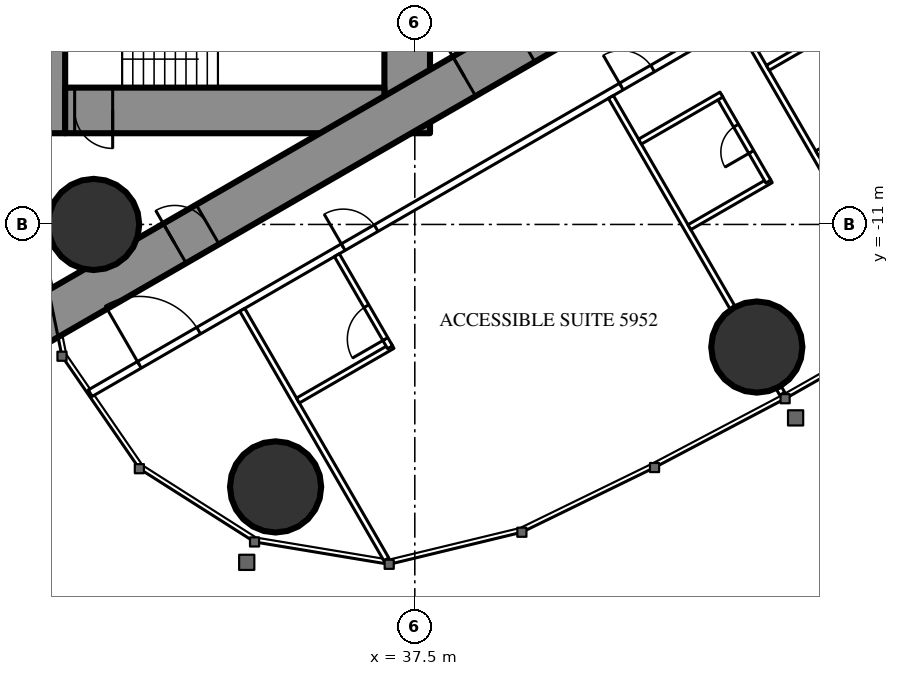
"""IFC4 building model, lengths in metres.
Left out: names, types, materials, properties, quantities, classifications, styles, units other than length and angle.
Written with IfcOpenShell. Run it as: python <this file> out.ifc"""

import sys

from ifc_helpers import new_model, si_unit, direction, frame, frame_2d, origin, origin_2d, place, context, subcontext, project, spatial, rectangle, circle, extrude, element, fill, save


model = new_model("IFC4")
c1 = context("Model", 3, precision=1e-05, world=origin(), true_north=direction((0.0, 1.0)))
c2 = subcontext(c1, "Body", "Model", "MODEL_VIEW")
j1 = project(units=[si_unit("LENGTHUNIT", "METRE"), si_unit("PLANEANGLEUNIT", "RADIAN")], contexts=[c1])
p1 = place(None, origin())
s1 = spatial("IfcSite", under=j1, at=p1, CompositionType="ELEMENT")
p2 = place(p1, origin())
s2 = spatial("IfcBuilding", under=s1, at=p2, CompositionType="ELEMENT")
p3 = place(p2, frame((0.0, 0.0, 222.5)))
s3 = spatial("IfcBuildingStorey", under=s2, at=p3, CompositionType="ELEMENT", Elevation=222.5)
for number, where, z_axis, x_axis in (
    (1, (33.837, -17.906, 0.0), (0.0, 0.0, 1.0), (1.0, 0.0, 0.0)),
    (2, (29.05, -11.0, 0.0), (0.0, 0.0, 1.0), (1.0, 0.0, 0.0)),
    (3, (46.499, -14.226, 0.0), (0.0, 0.0, 1.0), (1.0, 0.0, 0.0)),
):
    element("IfcColumn", number, at=place(p3, frame(where, z_axis=z_axis, x_axis=x_axis)), inside=s3, PredefinedType="COLUMN", context=c2, shape_type="SweptSolid", body=[
        extrude(circle(Radius=1.2, at=origin_2d()), origin(), (0.0, 0.0, 1.0), 3.6),
    ])
p4 = place(p3, frame((27.9, -8.6, 0.0), z_axis=(0.0, 0.0, 1.0), x_axis=(0.0, 1.0, 0.0)))
e4 = element("IfcWall", 4, at=p4, inside=s3, PredefinedType="SHEAR", context=c2, shape_type="SweptSolid", body=[
    extrude(rectangle(XDim=17.2, YDim=0.8, at=frame_2d((8.6, 0.0))), origin(), (0.0, 0.0, 1.0), 3.6),
])
p5 = place(p4, frame((9.35, 0.0, 0.0)))
e5 = element("IfcOpeningElement", 5, at=p5, cuts=e4, PredefinedType="OPENING", context=c2, shape_type="SweptSolid", body=[
    extrude(rectangle(XDim=0.9, YDim=2.2, at=frame_2d((0.45, 1.1))), frame((0.0, 0.41, 0.0), z_axis=(0.0, -1.0, 0.0), x_axis=(1.0, 0.0, 0.0)), (0.0, 0.0, 1.0), 0.82),
])
p6 = place(p3, frame((37.3, -8.6, 0.0), z_axis=(0.0, 0.0, 1.0), x_axis=(0.0, 1.0, 0.0)))
e6 = element("IfcWall", 6, at=p6, inside=s3, PredefinedType="SHEAR", context=c2, shape_type="SweptSolid", body=[
    extrude(rectangle(XDim=17.2, YDim=1.2, at=frame_2d((8.6, 0.0))), origin(), (0.0, 0.0, 1.0), 3.6),
])
p7 = place(p6, frame((7.7, 0.0, 0.0)))
e7 = element("IfcOpeningElement", 7, at=p7, cuts=e6, PredefinedType="OPENING", context=c2, shape_type="SweptSolid", body=[
    extrude(rectangle(XDim=1.8, YDim=2.2, at=frame_2d((0.9, 1.1))), frame((0.0, 0.61, 0.0), z_axis=(0.0, -1.0, 0.0), x_axis=(1.0, 0.0, 0.0)), (0.0, 0.0, 1.0), 1.22),
])
p8 = place(p3, frame((28.3, -8.0, 0.0), z_axis=(0.0, 0.0, 1.0), x_axis=(1.0, 0.0, 0.0)))
e8 = element("IfcWall", 8, at=p8, inside=s3, PredefinedType="SHEAR", context=c2, shape_type="SweptSolid", body=[
    extrude(rectangle(XDim=8.4, YDim=1.2, at=frame_2d((4.2, 0.0))), origin(), (0.0, 0.0, 1.0), 3.6),
])
p9 = place(p8, frame((0.25, 0.0, 0.0)))
e9 = element("IfcOpeningElement", 9, at=p9, cuts=e8, PredefinedType="OPENING", context=c2, shape_type="SweptSolid", body=[
    extrude(rectangle(XDim=1.0, YDim=2.2, at=frame_2d((0.5, 1.1))), frame((0.0, 0.61, 0.0), z_axis=(0.0, -1.0, 0.0), x_axis=(1.0, 0.0, 0.0)), (0.0, 0.0, 1.0), 1.22),
])
p10 = place(p3, frame((27.2, -13.8, 0.0), z_axis=(0.0, 0.0, 1.0), x_axis=(0.866027159892, 0.499996958321, 0.0)))
e10 = element("IfcWall", 10, at=p10, inside=s3, PredefinedType="SHEAR", context=c2, shape_type="SweptSolid", body=[
    extrude(rectangle(XDim=27.947, YDim=1.2, at=frame_2d((13.973, 0.0))), origin(), (0.0, 0.0, 1.0), 3.6),
])
p11 = place(p10, frame((4.6, 0.0, 0.0)))
e11 = element("IfcOpeningElement", 11, at=p11, cuts=e10, PredefinedType="OPENING", context=c2, shape_type="SweptSolid", body=[
    extrude(rectangle(XDim=1.0, YDim=2.2, at=frame_2d((0.5, 1.1))), frame((0.0, 0.61, 0.0), z_axis=(0.0, -1.0, 0.0), x_axis=(1.0, 0.0, 0.0)), (0.0, 0.0, 1.0), 1.22),
])
p12 = place(p10, frame((13.395, 0.0, 0.0)))
e12 = element("IfcOpeningElement", 12, at=p12, cuts=e10, PredefinedType="OPENING", context=c2, shape_type="SweptSolid", body=[
    extrude(rectangle(XDim=1.8, YDim=2.2, at=frame_2d((0.9, 1.1))), frame((0.0, 0.61, 0.0), z_axis=(0.0, -1.0, 0.0), x_axis=(1.0, 0.0, 0.0)), (0.0, 0.0, 1.0), 1.22),
])
p13 = place(p3, frame((28.959, -15.44, 0.0), z_axis=(0.0, 0.0, 1.0), x_axis=(0.866025227435, 0.500000305447, 0.0)))
e13 = element("IfcWall", 13, at=p13, inside=s3, PredefinedType="PARTITIONING", context=c2, shape_type="SweptSolid", body=[
    extrude(rectangle(XDim=30.88, YDim=0.2, at=frame_2d((15.44, 0.0))), origin(), (0.0, 0.0, 1.0), 3.35),
])
p14 = place(p13, frame((1.494, 0.0, 0.0)))
e14 = element("IfcOpeningElement", 14, at=p14, cuts=e13, PredefinedType="OPENING", context=c2, shape_type="SweptSolid", body=[
    extrude(rectangle(XDim=1.8, YDim=2.03, at=frame_2d((0.9, 1.015))), frame((0.0, 0.11, 0.0), z_axis=(0.0, -1.0, 0.0), x_axis=(1.0, 0.0, 0.0)), (0.0, 0.0, 1.0), 0.22),
])
p15 = place(p13, frame((7.687, 0.0, 0.0)))
e15 = element("IfcOpeningElement", 15, at=p15, cuts=e13, PredefinedType="OPENING", context=c2, shape_type="SweptSolid", body=[
    extrude(rectangle(XDim=1.0, YDim=2.2, at=frame_2d((0.5, 1.1))), frame((0.0, 0.11, 0.0), z_axis=(0.0, -1.0, 0.0), x_axis=(1.0, 0.0, 0.0)), (0.0, 0.0, 1.0), 0.22),
])
p16 = place(p13, frame((16.137, 0.0, 0.0)))
e16 = element("IfcOpeningElement", 16, at=p16, cuts=e13, PredefinedType="OPENING", context=c2, shape_type="SweptSolid", body=[
    extrude(rectangle(XDim=0.95, YDim=2.2, at=frame_2d((0.475, 1.1))), frame((0.0, 0.11, 0.0), z_axis=(0.0, -1.0, 0.0), x_axis=(1.0, 0.0, 0.0)), (0.0, 0.0, 1.0), 0.22),
])
p17 = place(p13, frame((20.021, 0.0, 0.0)))
e17 = element("IfcOpeningElement", 17, at=p17, cuts=e13, PredefinedType="OPENING", context=c2, shape_type="SweptSolid", body=[
    extrude(rectangle(XDim=0.95, YDim=2.2, at=frame_2d((0.475, 1.1))), frame((0.0, 0.11, 0.0), z_axis=(0.0, -1.0, 0.0), x_axis=(1.0, 0.0, 0.0)), (0.0, 0.0, 1.0), 0.22),
])
p18 = place(p13, frame((26.253, 0.0, 0.0)))
e18 = element("IfcOpeningElement", 18, at=p18, cuts=e13, PredefinedType="OPENING", context=c2, shape_type="SweptSolid", body=[
    extrude(rectangle(XDim=0.95, YDim=2.2, at=frame_2d((0.475, 1.1))), frame((0.0, 0.11, 0.0), z_axis=(0.0, -1.0, 0.0), x_axis=(1.0, 0.0, 0.0)), (0.0, 0.0, 1.0), 0.22),
])
p19 = place(p3, frame((32.96, -13.246, 0.0), z_axis=(0.0, 0.0, 1.0), x_axis=(0.500000236886, -0.866025267018, 0.0)))
e19 = element("IfcWall", 19, at=p19, inside=s3, PredefinedType="PARTITIONING", context=c2, shape_type="SweptSolid", body=[
    extrude(rectangle(XDim=7.583, YDim=0.15, at=frame_2d((3.791, 0.0))), origin(), (0.0, 0.0, 1.0), 3.35),
])
p20 = place(p3, frame((42.66, -7.646, 0.0), z_axis=(0.0, 0.0, 1.0), x_axis=(0.499996592859, -0.866027370889, 0.0)))
e20 = element("IfcWall", 20, at=p20, inside=s3, PredefinedType="PARTITIONING", context=c2, shape_type="SweptSolid", body=[
    extrude(rectangle(XDim=6.398, YDim=0.15, at=frame_2d((3.199, 0.0))), origin(), (0.0, 0.0, 1.0), 2.45),
])
p21 = place(p3, frame((47.079, -15.3, 0.0), z_axis=(0.0, 0.0, 1.0), x_axis=(0.499212083968, -0.866479829667, 0.0)))
e21 = element("IfcWall", 21, at=p21, inside=s3, PredefinedType="PARTITIONING", context=c2, shape_type="SweptSolid", body=[
    extrude(rectangle(XDim=0.179, YDim=0.15, at=frame_2d((0.09, 0.0))), origin(), (0.0, 0.0, 1.0), 2.45),
])
p22 = place(p3, frame((46.023, -5.704, 0.0), z_axis=(0.0, 0.0, 1.0), x_axis=(0.499984478165, -0.866034365135, 0.0)))
e22 = element("IfcWall", 22, at=p22, inside=s3, PredefinedType="PARTITIONING", context=c2, shape_type="SweptSolid", body=[
    extrude(rectangle(XDim=6.426, YDim=0.15, at=frame_2d((3.213, 0.0))), origin(), (0.0, 0.0, 1.0), 2.45),
])
p23 = place(p3, frame((34.425, -15.633, 0.0), z_axis=(0.0, 0.0, 1.0), x_axis=(0.866018712932, 0.500011588718, 0.0)))
e23 = element("IfcWall", 23, at=p23, inside=s3, PredefinedType="PARTITIONING", context=c2, shape_type="SweptSolid", body=[
    extrude(rectangle(XDim=2.875, YDim=0.15, at=frame_2d((1.438, 0.0))), origin(), (0.0, 0.0, 1.0), 3.35),
])
p24 = place(p3, frame((35.45, -11.808, 0.0), z_axis=(0.0, 0.0, 1.0), x_axis=(0.49994636267, -0.866056369097, 0.0)))
e24 = element("IfcWall", 24, at=p24, inside=s3, PredefinedType="PARTITIONING", context=c2, shape_type="SweptSolid", body=[
    extrude(rectangle(XDim=2.8, YDim=0.15, at=frame_2d((1.4, 0.0))), origin(), (0.0, 0.0, 1.0), 3.35),
])
p25 = place(p24, frame((1.55, 0.0, 0.0)))
e25 = element("IfcOpeningElement", 25, at=p25, cuts=e24, PredefinedType="OPENING", context=c2, shape_type="SweptSolid", body=[
    extrude(rectangle(XDim=1.0, YDim=2.2, at=frame_2d((0.5, 1.1))), frame((0.0, 0.085, 0.0), z_axis=(0.0, -1.0, 0.0), x_axis=(1.0, 0.0, 0.0)), (0.0, 0.0, 1.0), 0.17),
])
p26 = place(p3, frame((44.725, -11.072, 0.0), z_axis=(0.0, 0.0, 1.0), x_axis=(0.866006523861, 0.500032699561, 0.0)))
e26 = element("IfcWall", 26, at=p26, inside=s3, PredefinedType="PARTITIONING", context=c2, shape_type="SweptSolid", body=[
    extrude(rectangle(XDim=2.475, YDim=0.15, at=frame_2d((1.237, 0.0))), origin(), (0.0, 0.0, 1.0), 3.35),
])
p27 = place(p3, frame((45.503, -7.621, 0.0), z_axis=(0.0, 0.0, 1.0), x_axis=(0.500006934395, -0.866021400173, 0.0)))
e27 = element("IfcWall", 27, at=p27, inside=s3, PredefinedType="PARTITIONING", context=c2, shape_type="SweptSolid", body=[
    extrude(rectangle(XDim=2.6, YDim=0.15, at=frame_2d((1.3, 0.0))), origin(), (0.0, 0.0, 1.0), 3.35),
])
p28 = place(p27, frame((0.9, 0.0, 0.0)))
e28 = element("IfcOpeningElement", 28, at=p28, cuts=e27, PredefinedType="OPENING", context=c2, shape_type="SweptSolid", body=[
    extrude(rectangle(XDim=0.8, YDim=2.2, at=frame_2d((0.4, 1.1))), frame((0.0, 0.085, 0.0), z_axis=(0.0, -1.0, 0.0), x_axis=(1.0, 0.0, 0.0)), (0.0, 0.0, 1.0), 0.17),
])
for number, where, z_axis, x_axis in (
    (29, (43.425, -8.821, 0.0), (0.0, 0.0, 1.0), (0.866, 0.5, 0.0)),
    (30, (48.088, -9.13, 0.0), (0.0, 0.0, 1.0), (0.866, 0.5, 0.0)),
    (31, (46.788, -6.879, 0.0), (0.0, 0.0, 1.0), (0.866, 0.5, 0.0)),
):
    element("IfcWall", number, at=place(p3, frame(where, z_axis=z_axis, x_axis=x_axis)), inside=s3, PredefinedType="PARTITIONING", context=c2, shape_type="SweptSolid", body=[
        extrude(rectangle(XDim=2.475, YDim=0.15, at=frame_2d((1.237, 0.0))), origin(), (0.0, 0.0, 1.0), 3.35),
    ])
p29 = place(p14, origin())
e32 = element("IfcDoor", 32, at=p29, inside=s3, OperationType="DOUBLE_DOOR_SINGLE_SWING", PredefinedType="DOOR", context=c2, shape_type="SweptSolid", body=[
    extrude(rectangle(XDim=1.8, YDim=2.03, at=frame_2d((0.9, 1.015))), frame((0.0, 0.025, 0.0), z_axis=(0.0, -1.0, 0.0), x_axis=(1.0, 0.0, 0.0)), (0.0, 0.0, 1.0), 0.05),
])
fill(e14, e32)
p30 = place(p25, origin())
e33 = element("IfcDoor", 33, at=p30, inside=s3, OperationType="SINGLE_SWING_RIGHT", PredefinedType="DOOR", context=c2, shape_type="SweptSolid", body=[
    extrude(rectangle(XDim=1.0, YDim=2.2, at=frame_2d((0.5, 1.1))), frame((0.0, 0.025, 0.0), z_axis=(0.0, -1.0, 0.0), x_axis=(1.0, 0.0, 0.0)), (0.0, 0.0, 1.0), 0.05),
])
fill(e25, e33)
p31 = place(p15, origin())
e34 = element("IfcDoor", 34, at=p31, inside=s3, OperationType="SINGLE_SWING_LEFT", PredefinedType="DOOR", context=c2, shape_type="SweptSolid", body=[
    extrude(rectangle(XDim=1.0, YDim=2.2, at=frame_2d((0.5, 1.1))), frame((0.0, 0.025, 0.0), z_axis=(0.0, -1.0, 0.0), x_axis=(1.0, 0.0, 0.0)), (0.0, 0.0, 1.0), 0.05),
])
fill(e15, e34)
p32 = place(p28, origin())
e35 = element("IfcDoor", 35, at=p32, inside=s3, OperationType="SINGLE_SWING_RIGHT", PredefinedType="DOOR", context=c2, shape_type="SweptSolid", body=[
    extrude(rectangle(XDim=0.8, YDim=2.2, at=frame_2d((0.4, 1.1))), frame((0.0, 0.025, 0.0), z_axis=(0.0, -1.0, 0.0), x_axis=(1.0, 0.0, 0.0)), (0.0, 0.0, 1.0), 0.05),
])
fill(e28, e35)
p33 = place(p16, origin())
e36 = element("IfcDoor", 36, at=p33, inside=s3, OperationType="SINGLE_SWING_LEFT", PredefinedType="DOOR", context=c2, shape_type="SweptSolid", body=[
    extrude(rectangle(XDim=0.95, YDim=2.2, at=frame_2d((0.475, 1.1))), frame((0.0, 0.025, 0.0), z_axis=(0.0, -1.0, 0.0), x_axis=(1.0, 0.0, 0.0)), (0.0, 0.0, 1.0), 0.05),
])
fill(e16, e36)
p34 = place(p11, origin())
e37 = element("IfcDoor", 37, at=p34, inside=s3, OperationType="SINGLE_SWING_LEFT", PredefinedType="DOOR", context=c2, shape_type="SweptSolid", body=[
    extrude(rectangle(XDim=1.0, YDim=2.2, at=frame_2d((0.5, 1.1))), frame((0.0, 0.025, 0.0), z_axis=(0.0, -1.0, 0.0), x_axis=(1.0, 0.0, 0.0)), (0.0, 0.0, 1.0), 0.05),
])
fill(e11, e37)
p35 = place(p12, origin())
e38 = element("IfcDoor", 38, at=p35, inside=s3, OperationType="DOUBLE_DOOR_SINGLE_SWING", PredefinedType="DOOR", context=c2, shape_type="SweptSolid", body=[
    extrude(rectangle(XDim=1.8, YDim=2.2, at=frame_2d((0.9, 1.1))), frame((0.0, 0.025, 0.0), z_axis=(0.0, -1.0, 0.0), x_axis=(1.0, 0.0, 0.0)), (0.0, 0.0, 1.0), 0.05),
])
fill(e12, e38)
p36 = place(p9, origin())
e39 = element("IfcDoor", 39, at=p36, inside=s3, OperationType="SINGLE_SWING_RIGHT", PredefinedType="DOOR", context=c2, shape_type="SweptSolid", body=[
    extrude(rectangle(XDim=1.0, YDim=2.2, at=frame_2d((0.5, 1.1))), frame((0.0, 0.025, 0.0), z_axis=(0.0, -1.0, 0.0), x_axis=(1.0, 0.0, 0.0)), (0.0, 0.0, 1.0), 0.05),
])
fill(e9, e39)
save(model, sys.argv[1])
